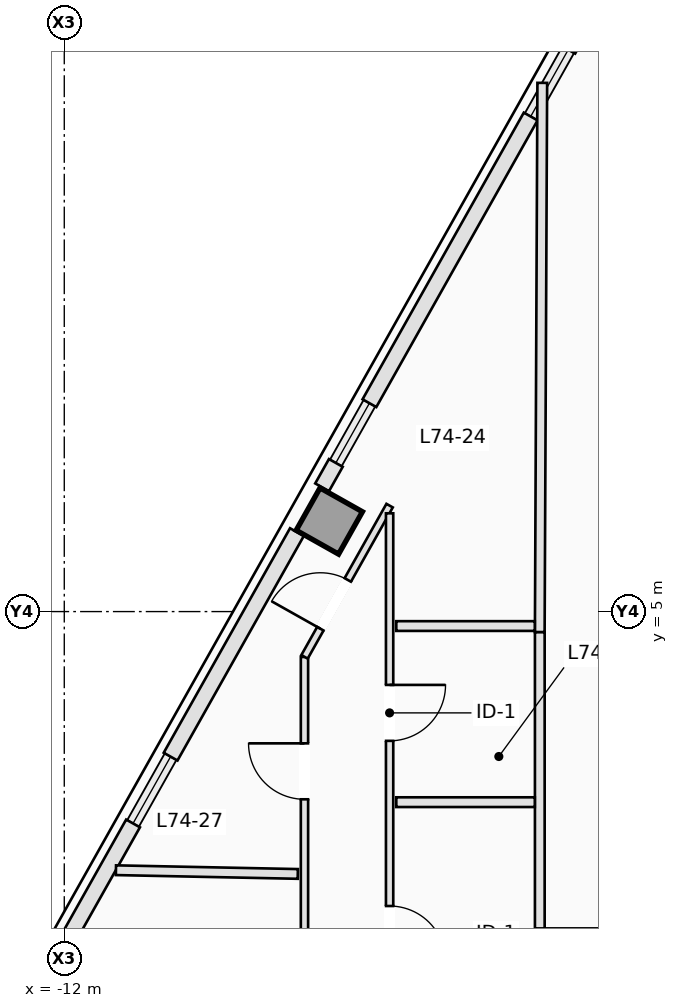
"""IFC4 building model, lengths in metres.
Left out: names, types, materials, properties, quantities, classifications, styles, units other than length and angle.
Written with IfcOpenShell. Run it as: python <this file> out.ifc"""

import sys

from ifc_helpers import new_model, si_unit, direction, frame, frame_2d, origin, origin_2d, place, context, subcontext, project, spatial, rectangle, extrude, element, fill, save


model = new_model("IFC4")
c1 = context("Model", 3, precision=1e-05, world=origin(), true_north=direction((0.0, 1.0)))
c2 = subcontext(c1, "Body", "Model", "MODEL_VIEW")
j1 = project(units=[si_unit("LENGTHUNIT", "METRE"), si_unit("PLANEANGLEUNIT", "RADIAN")], contexts=[c1])
p1 = place(None, origin())
s1 = spatial("IfcSite", under=j1, at=p1, CompositionType="ELEMENT")
p2 = place(p1, origin())
s2 = spatial("IfcBuilding", under=s1, at=p2, CompositionType="ELEMENT")
p3 = place(p2, frame((0.0, 0.0, 267.4)))
s3 = spatial("IfcBuildingStorey", under=s2, at=p3, CompositionType="ELEMENT", Elevation=267.4)
p4 = place(p3, frame((-7.642, 6.489, 0.0), z_axis=(0.0, 0.0, 1.0), x_axis=(-0.871575139605, 0.490261946333, 0.0)))
e1 = element("IfcColumn", 1, at=p4, inside=s3, PredefinedType="COLUMN", context=c2, shape_type="SweptSolid", body=[
    extrude(rectangle(XDim=0.8, YDim=0.8, at=origin_2d()), origin(), (0.0, 0.0, 1.0), 3.5),
])
p5 = place(p3, frame((-7.76, 7.044, 0.0), z_axis=(0.0, 0.0, 1.0), x_axis=(0.490412424957, 0.871490478116, 0.0)))
e2 = element("IfcWall", 2, at=p5, inside=s3, PredefinedType="STANDARD", context=c2, shape_type="SweptSolid", body=[
    extrude(rectangle(XDim=0.46, YDim=0.26, at=frame_2d((0.23, 0.0))), origin(), (0.0, 0.0, 1.0), 3.18),
])
p6 = place(p3, frame((-6.982, 8.427, 0.0), z_axis=(0.0, 0.0, 1.0), x_axis=(0.490265525523, 0.871573126297, 0.0)))
e3 = element("IfcWall", 3, at=p6, inside=s3, PredefinedType="STANDARD", context=c2, shape_type="SweptSolid", body=[
    extrude(rectangle(XDim=5.409, YDim=0.26, at=frame_2d((2.705, 0.0))), origin(), (0.0, 0.0, 1.0), 3.18),
])
p7 = place(p3, frame((-3.712, 14.24, 0.0), z_axis=(0.0, 0.0, 1.0), x_axis=(0.490261239633, 0.871575537125, 0.0)))
e4 = element("IfcWall", 4, at=p7, inside=s3, PredefinedType="STANDARD", context=c2, shape_type="SweptSolid", body=[
    extrude(rectangle(XDim=1.82, YDim=0.26, at=frame_2d((0.91, 0.0))), origin(), (0.0, 0.0, 1.0), 3.18),
])
p8 = place(p3, frame((-12.946, -2.177, 0.0), z_axis=(0.0, 0.0, 1.0), x_axis=(0.490244825075, 0.871584770109, 0.0)))
e5 = element("IfcWall", 5, at=p8, inside=s3, PredefinedType="STANDARD", context=c2, shape_type="SweptSolid", body=[
    extrude(rectangle(XDim=4.237, YDim=0.26, at=frame_2d((2.119, 0.0))), origin(), (0.0, 0.0, 1.0), 3.18),
])
p9 = place(p3, frame((-10.251, 2.615, 0.0), z_axis=(0.0, 0.0, 1.0), x_axis=(0.490269447258, 0.871570920284, 0.0)))
e6 = element("IfcWall", 6, at=p9, inside=s3, PredefinedType="STANDARD", context=c2, shape_type="SweptSolid", body=[
    extrude(rectangle(XDim=4.237, YDim=0.26, at=frame_2d((2.118, 0.0))), origin(), (0.0, 0.0, 1.0), 3.18),
])
p10 = place(p3, frame((-8.05, -2.668, 0.0), z_axis=(0.0, 0.0, 1.0), x_axis=(0.0, 1.0, 0.0)))
e7 = element("IfcWall", 7, at=p10, inside=s3, PredefinedType="PARTITIONING", context=c2, shape_type="SweptSolid", body=[
    extrude(rectangle(XDim=6.922, YDim=0.12, at=frame_2d((3.461, 0.0))), origin(), (0.0, 0.0, 1.0), 3.18),
])
p11 = place(p10, frame((4.581, 0.0, 0.0)))
e8 = element("IfcOpeningElement", 8, at=p11, cuts=e7, PredefinedType="OPENING", context=c2, shape_type="SweptSolid", body=[
    extrude(rectangle(XDim=0.92, YDim=2.12, at=frame_2d((0.46, 1.06))), frame((0.0, 0.07, 0.0), z_axis=(0.0, -1.0, 0.0), x_axis=(1.0, 0.0, 0.0)), (0.0, 0.0, 1.0), 0.14),
])
p12 = place(p3, frame((-8.049, 4.256, 0.0), z_axis=(0.0, 0.0, 1.0), x_axis=(0.490249053239, 0.871582391859, 0.0)))
e9 = element("IfcWall", 9, at=p12, inside=s3, PredefinedType="PARTITIONING", context=c2, shape_type="SweptSolid", body=[
    extrude(rectangle(XDim=2.854, YDim=0.12, at=frame_2d((1.427, 0.0))), origin(), (0.0, 0.0, 1.0), 3.18),
])
p13 = place(p12, frame((0.531, 0.0, 0.0)))
e10 = element("IfcOpeningElement", 10, at=p13, cuts=e9, PredefinedType="OPENING", context=c2, shape_type="SweptSolid", body=[
    extrude(rectangle(XDim=0.92, YDim=2.12, at=frame_2d((0.46, 1.06))), frame((0.0, 0.07, 0.0), z_axis=(0.0, -1.0, 0.0), x_axis=(1.0, 0.0, 0.0)), (0.0, 0.0, 1.0), 0.14),
])
p14 = place(p3, frame((-6.65, 6.616, 0.0), z_axis=(0.0, 0.0, 1.0), x_axis=(0.0, -1.0, 0.0)))
e11 = element("IfcWall", 11, at=p14, inside=s3, PredefinedType="PARTITIONING", context=c2, shape_type="SweptSolid", body=[
    extrude(rectangle(XDim=9.346, YDim=0.12, at=frame_2d((4.673, 0.0))), origin(), (0.0, 0.0, 1.0), 3.18),
])
p15 = place(p14, frame((2.822, 0.0, 0.0)))
e12 = element("IfcOpeningElement", 12, at=p15, cuts=e11, PredefinedType="OPENING", context=c2, shape_type="SweptSolid", body=[
    extrude(rectangle(XDim=0.92, YDim=2.12, at=frame_2d((0.46, 1.06))), frame((0.0, 0.07, 0.0), z_axis=(0.0, -1.0, 0.0), x_axis=(1.0, 0.0, 0.0)), (0.0, 0.0, 1.0), 0.14),
])
p16 = place(p14, frame((6.458, 0.0, 0.0)))
e13 = element("IfcOpeningElement", 13, at=p16, cuts=e11, PredefinedType="OPENING", context=c2, shape_type="SweptSolid", body=[
    extrude(rectangle(XDim=0.92, YDim=2.12, at=frame_2d((0.46, 1.06))), frame((0.0, 0.07, 0.0), z_axis=(0.0, -1.0, 0.0), x_axis=(1.0, 0.0, 0.0)), (0.0, 0.0, 1.0), 0.14),
])
p17 = place(p3, frame((-4.139, 13.695, 0.0), z_axis=(0.0, 0.0, 1.0), x_axis=(-0.004567766824, -0.999989567699, 0.0)))
e14 = element("IfcWall", 14, at=p17, inside=s3, PredefinedType="PARTITIONING", context=c2, shape_type="SweptSolid", body=[
    extrude(rectangle(XDim=9.033, YDim=0.16, at=frame_2d((4.516, 0.0))), origin(), (0.0, 0.0, 1.0), 3.18),
])
p18 = place(p3, frame((-4.262, 4.762, 0.0), z_axis=(0.0, 0.0, 1.0), x_axis=(-1.0, 0.0, 0.0)))
e15 = element("IfcWall", 15, at=p18, inside=s3, PredefinedType="PARTITIONING", context=c2, shape_type="SweptSolid", body=[
    extrude(rectangle(XDim=2.278, YDim=0.16, at=frame_2d((1.139, 0.0))), origin(), (0.0, 0.0, 1.0), 2.873),
])
p19 = place(p3, frame((-4.18, -0.21, 0.0), z_axis=(0.0, 0.0, 1.0), x_axis=(0.0, 1.0, 0.0)))
e16 = element("IfcWall", 16, at=p19, inside=s3, PredefinedType="PARTITIONING", context=c2, shape_type="SweptSolid", body=[
    extrude(rectangle(XDim=4.87, YDim=0.16, at=frame_2d((2.435, 0.0))), origin(), (0.0, 0.0, 1.0), 3.18),
])
p20 = place(p3, frame((-4.262, 1.866, 0.0), z_axis=(0.0, 0.0, 1.0), x_axis=(-1.0, 0.0, 0.0)))
e17 = element("IfcWall", 17, at=p20, inside=s3, PredefinedType="PARTITIONING", context=c2, shape_type="SweptSolid", body=[
    extrude(rectangle(XDim=2.278, YDim=0.16, at=frame_2d((1.139, 0.0))), origin(), (0.0, 0.0, 1.0), 2.873),
])
p21 = place(p3, frame((-8.16, 0.686, 0.0), z_axis=(0.0, 0.0, 1.0), x_axis=(-0.999790115951, 0.020487167859, 0.0)))
e18 = element("IfcWall", 18, at=p21, inside=s3, PredefinedType="PARTITIONING", context=c2, shape_type="SweptSolid", body=[
    extrude(rectangle(XDim=2.991, YDim=0.16, at=frame_2d((1.496, 0.0))), origin(), (0.0, 0.0, 1.0), 3.18),
])
p22 = place(p13, origin())
e19 = element("IfcDoor", 19, at=p22, inside=s3, OperationType="SINGLE_SWING_LEFT", PredefinedType="DOOR", context=c2, shape_type="SweptSolid", body=[
    extrude(rectangle(XDim=0.92, YDim=2.12, at=frame_2d((0.46, 1.06))), frame((0.0, 0.025, 0.0), z_axis=(0.0, -1.0, 0.0), x_axis=(1.0, 0.0, 0.0)), (0.0, 0.0, 1.0), 0.05),
])
fill(e10, e19)
p23 = place(p15, origin())
e20 = element("IfcDoor", 20, at=p23, inside=s3, OperationType="SINGLE_SWING_LEFT", PredefinedType="DOOR", context=c2, shape_type="SweptSolid", body=[
    extrude(rectangle(XDim=0.92, YDim=2.12, at=frame_2d((0.46, 1.06))), frame((0.0, 0.025, 0.0), z_axis=(0.0, -1.0, 0.0), x_axis=(1.0, 0.0, 0.0)), (0.0, 0.0, 1.0), 0.05),
])
fill(e12, e20)
p24 = place(p11, origin())
e21 = element("IfcDoor", 21, at=p24, inside=s3, OperationType="SINGLE_SWING_RIGHT", PredefinedType="DOOR", context=c2, shape_type="SweptSolid", body=[
    extrude(rectangle(XDim=0.92, YDim=2.12, at=frame_2d((0.46, 1.06))), frame((0.0, 0.025, 0.0), z_axis=(0.0, -1.0, 0.0), x_axis=(1.0, 0.0, 0.0)), (0.0, 0.0, 1.0), 0.05),
])
fill(e8, e21)
p25 = place(p16, origin())
e22 = element("IfcDoor", 22, at=p25, inside=s3, OperationType="SINGLE_SWING_RIGHT", PredefinedType="DOOR", context=c2, shape_type="SweptSolid", body=[
    extrude(rectangle(XDim=0.92, YDim=2.12, at=frame_2d((0.46, 1.06))), frame((0.0, 0.025, 0.0), z_axis=(0.0, -1.0, 0.0), x_axis=(1.0, 0.0, 0.0)), (0.0, 0.0, 1.0), 0.05),
])
fill(e13, e22)
save(model, sys.argv[1])
